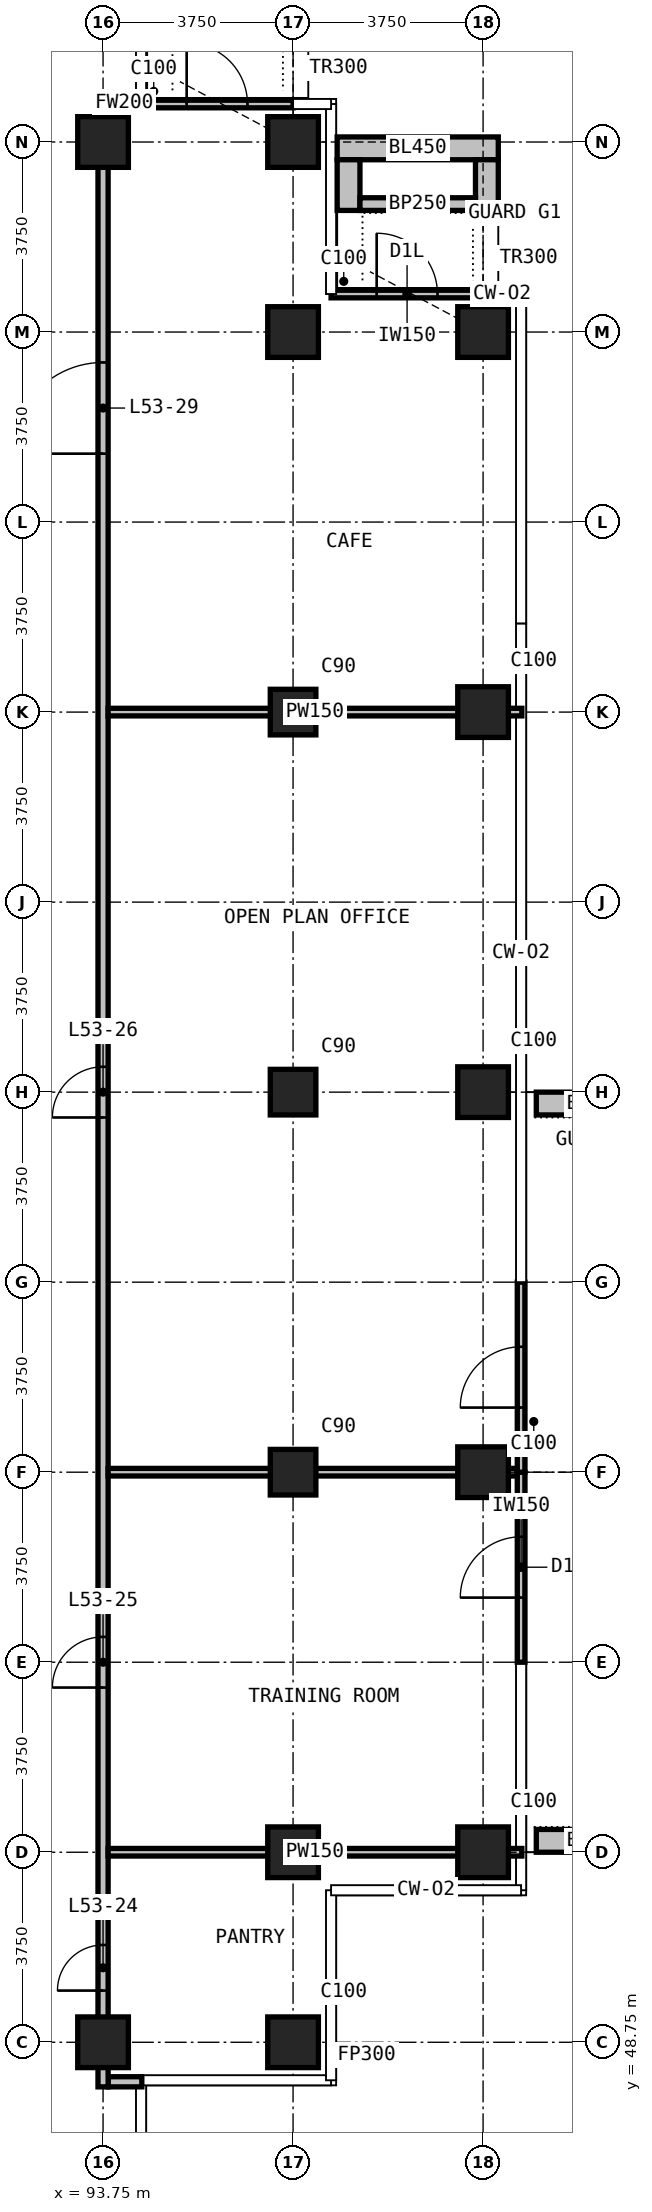
"""IFC4 building model, lengths in metres.
Left out: names, types, materials, properties, quantities, classifications, styles, units other than length and angle.
Written with IfcOpenShell. Run it as: python <this file> out.ifc"""

import sys

from ifc_helpers import new_model, si_unit, direction, frame, frame_2d, origin, origin_2d, place, context, subcontext, project, spatial, rectangle, extrude, element, fill, save


model = new_model("IFC4")
c1 = context("Model", 3, precision=1e-05, world=origin(), true_north=direction((0.0, 1.0)))
c2 = subcontext(c1, "Body", "Model", "MODEL_VIEW")
j1 = project(units=[si_unit("LENGTHUNIT", "METRE"), si_unit("PLANEANGLEUNIT", "RADIAN")], contexts=[c1])
p1 = place(None, origin())
s1 = spatial("IfcSite", under=j1, at=p1, CompositionType="ELEMENT")
p2 = place(p1, origin())
s2 = spatial("IfcBuilding", under=s1, at=p2, CompositionType="ELEMENT")
p3 = place(p2, frame((0.0, 0.0, 206.7)))
s3 = spatial("IfcBuildingStorey", under=s2, at=p3, CompositionType="ELEMENT", Elevation=206.7)
for number, where, z_axis, x_axis in (
    (1, (93.75, 48.75, 0.0), (0.0, 0.0, 1.0), (1.0, 0.0, 0.0)),
    (2, (93.75, 86.25, 0.0), (0.0, 0.0, 1.0), (1.0, 0.0, 0.0)),
    (3, (97.5, 48.75, 0.0), (0.0, 0.0, 1.0), (1.0, 0.0, 0.0)),
    (4, (97.5, 52.5, 0.0), (0.0, 0.0, 1.0), (1.0, 0.0, 0.0)),
):
    element("IfcColumn", number, at=place(p3, frame(where, z_axis=z_axis, x_axis=x_axis)), inside=s3, PredefinedType="COLUMN", context=c2, shape_type="SweptSolid", body=[
        extrude(rectangle(XDim=1.0, YDim=1.0, at=origin_2d()), origin(), (0.0, 0.0, 1.0), 3.6),
    ])
for number, where, z_axis, x_axis in (
    (5, (97.5, 60.0, 0.0), (0.0, 0.0, 1.0), (1.0, 0.0, 0.0)),
    (6, (97.5, 67.5, 0.0), (0.0, 0.0, 1.0), (1.0, 0.0, 0.0)),
    (7, (97.5, 75.0, 0.0), (0.0, 0.0, 1.0), (1.0, 0.0, 0.0)),
):
    element("IfcColumn", number, at=place(p3, frame(where, z_axis=z_axis, x_axis=x_axis)), inside=s3, PredefinedType="COLUMN", context=c2, shape_type="SweptSolid", body=[
        extrude(rectangle(XDim=0.9, YDim=0.9, at=origin_2d()), origin(), (0.0, 0.0, 1.0), 3.6),
    ])
for number, where, z_axis, x_axis in (
    (8, (97.5, 82.5, 0.0), (0.0, 0.0, 1.0), (1.0, 0.0, 0.0)),
    (9, (97.5, 86.25, 0.0), (0.0, 0.0, 1.0), (1.0, 0.0, 0.0)),
    (10, (101.25, 52.5, 0.0), (0.0, 0.0, 1.0), (1.0, 0.0, 0.0)),
    (11, (101.25, 60.0, 0.0), (0.0, 0.0, 1.0), (1.0, 0.0, 0.0)),
    (12, (101.25, 67.5, 0.0), (0.0, 0.0, 1.0), (1.0, 0.0, 0.0)),
    (13, (101.25, 75.0, 0.0), (0.0, 0.0, 1.0), (1.0, 0.0, 0.0)),
    (14, (101.25, 82.5, 0.0), (0.0, 0.0, 1.0), (1.0, 0.0, 0.0)),
):
    element("IfcColumn", number, at=place(p3, frame(where, z_axis=z_axis, x_axis=x_axis)), inside=s3, PredefinedType="COLUMN", context=c2, shape_type="SweptSolid", body=[
        extrude(rectangle(XDim=1.0, YDim=1.0, at=origin_2d()), origin(), (0.0, 0.0, 1.0), 3.6),
    ])
p4 = place(p3, frame((102.0, 56.25, 0.0), z_axis=(0.0, 0.0, 1.0), x_axis=(0.0, 1.0, 0.0)))
e15 = element("IfcWall", 15, at=p4, inside=s3, PredefinedType="SOLIDWALL", context=c2, shape_type="SweptSolid", body=[
    extrude(rectangle(XDim=3.75, YDim=0.15, at=frame_2d((1.875, 0.0))), origin(), (0.0, 0.0, 1.0), 3.3),
])
p5 = place(p4, frame((1.275, 0.0, 0.0)))
e16 = element("IfcOpeningElement", 16, at=p5, cuts=e15, PredefinedType="OPENING", context=c2, shape_type="SweptSolid", body=[
    extrude(rectangle(XDim=1.2, YDim=2.4, at=frame_2d((0.6, 1.2))), frame((0.0, 0.085, 0.0), z_axis=(0.0, -1.0, 0.0), x_axis=(1.0, 0.0, 0.0)), (0.0, 0.0, 1.0), 0.17),
])
p6 = place(p3, frame((102.0, 60.0, 0.0), z_axis=(0.0, 0.0, 1.0), x_axis=(0.0, 1.0, 0.0)))
e17 = element("IfcWall", 17, at=p6, inside=s3, PredefinedType="SOLIDWALL", context=c2, shape_type="SweptSolid", body=[
    extrude(rectangle(XDim=3.75, YDim=0.15, at=frame_2d((1.875, 0.0))), origin(), (0.0, 0.0, 1.0), 3.3),
])
p7 = place(p6, frame((1.275, 0.0, 0.0)))
e18 = element("IfcOpeningElement", 18, at=p7, cuts=e17, PredefinedType="OPENING", context=c2, shape_type="SweptSolid", body=[
    extrude(rectangle(XDim=1.2, YDim=2.4, at=frame_2d((0.6, 1.2))), frame((0.0, 0.085, 0.0), z_axis=(0.0, -1.0, 0.0), x_axis=(1.0, 0.0, 0.0)), (0.0, 0.0, 1.0), 0.17),
])
p8 = place(p3, frame((98.25, 83.25, 0.0), z_axis=(0.0, 0.0, 1.0), x_axis=(1.0, 0.0, 0.0)))
e19 = element("IfcWall", 19, at=p8, inside=s3, PredefinedType="SOLIDWALL", context=c2, shape_type="SweptSolid", body=[
    extrude(rectangle(XDim=3.0, YDim=0.15, at=frame_2d((1.5, 0.0))), origin(), (0.0, 0.0, 1.0), 3.3),
])
p9 = place(p8, frame((0.9, 0.0, 0.0)))
e20 = element("IfcOpeningElement", 20, at=p9, cuts=e19, PredefinedType="OPENING", context=c2, shape_type="SweptSolid", body=[
    extrude(rectangle(XDim=1.2, YDim=2.0, at=frame_2d((0.6, 1.0))), frame((0.0, 0.085, 0.0), z_axis=(0.0, -1.0, 0.0), x_axis=(1.0, 0.0, 0.0)), (0.0, 0.0, 1.0), 0.17),
])
p10 = place(p3, frame((94.5, 87.0, 0.0), z_axis=(0.0, 0.0, 1.0), x_axis=(1.0, 0.0, 0.0)))
e21 = element("IfcWall", 21, at=p10, inside=s3, PredefinedType="SOLIDWALL", context=c2, shape_type="SweptSolid", body=[
    extrude(rectangle(XDim=3.0, YDim=0.15, at=frame_2d((1.5, 0.0))), origin(), (0.0, 0.0, 1.0), 3.3),
])
p11 = place(p10, frame((0.9, 0.0, 0.0)))
e22 = element("IfcOpeningElement", 22, at=p11, cuts=e21, PredefinedType="OPENING", context=c2, shape_type="SweptSolid", body=[
    extrude(rectangle(XDim=1.2, YDim=2.0, at=frame_2d((0.6, 1.0))), frame((0.0, 0.085, 0.0), z_axis=(0.0, -1.0, 0.0), x_axis=(1.0, 0.0, 0.0)), (0.0, 0.0, 1.0), 0.17),
])
for number, where, z_axis, x_axis in (
    (23, (102.3, 52.725, 0.0), (0.0, 0.0, 1.0), (1.0, 0.0, 0.0)),
    (24, (102.3, 67.275, 0.0), (0.0, 0.0, 1.0), (1.0, 0.0, 0.0)),
):
    element("IfcWall", number, at=place(p3, frame(where, z_axis=z_axis, x_axis=x_axis)), inside=s3, PredefinedType="USERDEFINED", context=c2, shape_type="SweptSolid", body=[
        extrude(rectangle(XDim=2.35, YDim=0.45, at=frame_2d((1.175, 0.0))), origin(), (0.0, 0.0, 1.0), 1.1),
    ])
p12 = place(p3, frame((98.37, 86.125, 0.0), z_axis=(0.0, 0.0, 1.0), x_axis=(1.0, 0.0, 0.0)))
e25 = element("IfcWall", 25, at=p12, inside=s3, PredefinedType="USERDEFINED", context=c2, shape_type="SweptSolid", body=[
    extrude(rectangle(XDim=3.18, YDim=0.45, at=frame_2d((1.59, 0.0))), origin(), (0.0, 0.0, 1.0), 1.1),
])
for number, where, z_axis, x_axis in (
    (26, (98.595, 84.9, 0.0), (0.0, 0.0, 1.0), (0.0, 1.0, 0.0)),
    (27, (101.325, 84.9, 0.0), (0.0, 0.0, 1.0), (0.0, 1.0, 0.0)),
):
    element("IfcWall", number, at=place(p3, frame(where, z_axis=z_axis, x_axis=x_axis)), inside=s3, PredefinedType="USERDEFINED", context=c2, shape_type="SweptSolid", body=[
        extrude(rectangle(XDim=1.0, YDim=0.45, at=frame_2d((0.5, 0.0))), origin(), (0.0, 0.0, 1.0), 1.1),
    ])
p13 = place(p3, frame((98.82, 85.025, 0.0), z_axis=(0.0, 0.0, 1.0), x_axis=(1.0, 0.0, 0.0)))
e28 = element("IfcWall", 28, at=p13, inside=s3, PredefinedType="USERDEFINED", context=c2, shape_type="SweptSolid", body=[
    extrude(rectangle(XDim=2.28, YDim=0.25, at=frame_2d((1.14, 0.0))), origin(), (0.0, 0.0, 1.0), 1.0),
])
p14 = place(p3, frame((93.85, 47.97, 0.0), z_axis=(0.0, 0.0, 1.0), x_axis=(1.0, 0.0, 0.0)))
e29 = element("IfcWall", 29, at=p14, inside=s3, PredefinedType="PARTITIONING", context=c2, shape_type="SweptSolid", body=[
    extrude(rectangle(XDim=0.665, YDim=0.2, at=frame_2d((0.333, 0.0))), origin(), (0.0, 0.0, 1.0), 3.3),
])
p15 = place(p3, frame((93.85, 87.03, 0.0), z_axis=(0.0, 0.0, 1.0), x_axis=(1.0, 0.0, 0.0)))
e30 = element("IfcWall", 30, at=p15, inside=s3, PredefinedType="PARTITIONING", context=c2, shape_type="SweptSolid", body=[
    extrude(rectangle(XDim=0.64, YDim=0.2, at=frame_2d((0.32, 0.0))), origin(), (0.0, 0.0, 1.0), 3.3),
])
p16 = place(p3, frame((93.75, 47.87, 0.0), z_axis=(0.0, 0.0, 1.0), x_axis=(0.0, 1.0, 0.0)))
e31 = element("IfcWall", 31, at=p16, inside=s3, PredefinedType="PARTITIONING", context=c2, shape_type="SweptSolid", body=[
    extrude(rectangle(XDim=39.26, YDim=0.2, at=frame_2d((19.63, 0.0))), origin(), (0.0, 0.0, 1.0), 3.3),
])
p17 = place(p16, frame((1.9, 0.0, 0.0)))
e32 = element("IfcOpeningElement", 32, at=p17, cuts=e31, PredefinedType="OPENING", context=c2, shape_type="SweptSolid", body=[
    extrude(rectangle(XDim=0.9, YDim=2.2, at=frame_2d((0.45, 1.1))), frame((0.0, 0.11, 0.0), z_axis=(0.0, -1.0, 0.0), x_axis=(1.0, 0.0, 0.0)), (0.0, 0.0, 1.0), 0.22),
])
p18 = place(p16, frame((7.88, 0.0, 0.0)))
e33 = element("IfcOpeningElement", 33, at=p18, cuts=e31, PredefinedType="OPENING", context=c2, shape_type="SweptSolid", body=[
    extrude(rectangle(XDim=1.0, YDim=2.2, at=frame_2d((0.5, 1.1))), frame((0.0, 0.11, 0.0), z_axis=(0.0, -1.0, 0.0), x_axis=(1.0, 0.0, 0.0)), (0.0, 0.0, 1.0), 0.22),
])
p19 = place(p16, frame((19.13, 0.0, 0.0)))
e34 = element("IfcOpeningElement", 34, at=p19, cuts=e31, PredefinedType="OPENING", context=c2, shape_type="SweptSolid", body=[
    extrude(rectangle(XDim=1.0, YDim=2.2, at=frame_2d((0.5, 1.1))), frame((0.0, 0.11, 0.0), z_axis=(0.0, -1.0, 0.0), x_axis=(1.0, 0.0, 0.0)), (0.0, 0.0, 1.0), 0.22),
])
p20 = place(p16, frame((32.23, 0.0, 0.0)))
e35 = element("IfcOpeningElement", 35, at=p20, cuts=e31, PredefinedType="OPENING", context=c2, shape_type="SweptSolid", body=[
    extrude(rectangle(XDim=1.8, YDim=2.2, at=frame_2d((0.9, 1.1))), frame((0.0, 0.11, 0.0), z_axis=(0.0, -1.0, 0.0), x_axis=(1.0, 0.0, 0.0)), (0.0, 0.0, 1.0), 0.22),
])
p21 = place(p3, frame((93.85, 52.5, 0.0), z_axis=(0.0, 0.0, 1.0), x_axis=(1.0, 0.0, 0.0)))
e36 = element("IfcWall", 36, at=p21, inside=s3, PredefinedType="PARTITIONING", context=c2, shape_type="SweptSolid", body=[
    extrude(rectangle(XDim=8.165, YDim=0.15, at=frame_2d((4.083, 0.0))), origin(), (0.0, 0.0, 1.0), 3.3),
])
p22 = place(p3, frame((93.85, 60.0, 0.0), z_axis=(0.0, 0.0, 1.0), x_axis=(1.0, 0.0, 0.0)))
e37 = element("IfcWall", 37, at=p22, inside=s3, PredefinedType="PARTITIONING", context=c2, shape_type="SweptSolid", body=[
    extrude(rectangle(XDim=8.065, YDim=0.15, at=frame_2d((4.032, 0.0))), origin(), (0.0, 0.0, 1.0), 3.3),
])
p23 = place(p3, frame((93.85, 75.0, 0.0), z_axis=(0.0, 0.0, 1.0), x_axis=(1.0, 0.0, 0.0)))
e38 = element("IfcWall", 38, at=p23, inside=s3, PredefinedType="PARTITIONING", context=c2, shape_type="SweptSolid", body=[
    extrude(rectangle(XDim=8.165, YDim=0.15, at=frame_2d((4.083, 0.0))), origin(), (0.0, 0.0, 1.0), 3.3),
])
p24 = place(p5, origin())
e39 = element("IfcDoor", 39, at=p24, inside=s3, OperationType="SINGLE_SWING_LEFT", PredefinedType="DOOR", context=c2, shape_type="SweptSolid", body=[
    extrude(rectangle(XDim=1.2, YDim=2.4, at=frame_2d((0.6, 1.2))), frame((0.0, 0.025, 0.0), z_axis=(0.0, -1.0, 0.0), x_axis=(1.0, 0.0, 0.0)), (0.0, 0.0, 1.0), 0.05),
])
fill(e16, e39)
p25 = place(p7, origin())
e40 = element("IfcDoor", 40, at=p25, inside=s3, OperationType="SINGLE_SWING_LEFT", PredefinedType="DOOR", context=c2, shape_type="SweptSolid", body=[
    extrude(rectangle(XDim=1.2, YDim=2.4, at=frame_2d((0.6, 1.2))), frame((0.0, 0.025, 0.0), z_axis=(0.0, -1.0, 0.0), x_axis=(1.0, 0.0, 0.0)), (0.0, 0.0, 1.0), 0.05),
])
fill(e18, e40)
p26 = place(p9, origin())
e41 = element("IfcDoor", 41, at=p26, inside=s3, OperationType="SINGLE_SWING_LEFT", PredefinedType="DOOR", context=c2, shape_type="SweptSolid", body=[
    extrude(rectangle(XDim=1.2, YDim=2.0, at=frame_2d((0.6, 1.0))), frame((0.0, 0.025, 0.0), z_axis=(0.0, -1.0, 0.0), x_axis=(1.0, 0.0, 0.0)), (0.0, 0.0, 1.0), 0.05),
])
fill(e20, e41)
p27 = place(p11, origin())
e42 = element("IfcDoor", 42, at=p27, inside=s3, OperationType="SINGLE_SWING_LEFT", PredefinedType="DOOR", context=c2, shape_type="SweptSolid", body=[
    extrude(rectangle(XDim=1.2, YDim=2.0, at=frame_2d((0.6, 1.0))), frame((0.0, 0.025, 0.0), z_axis=(0.0, -1.0, 0.0), x_axis=(1.0, 0.0, 0.0)), (0.0, 0.0, 1.0), 0.05),
])
fill(e22, e42)
p28 = place(p17, origin())
e43 = element("IfcDoor", 43, at=p28, inside=s3, OperationType="SINGLE_SWING_LEFT", PredefinedType="DOOR", context=c2, shape_type="SweptSolid", body=[
    extrude(rectangle(XDim=0.9, YDim=2.2, at=frame_2d((0.45, 1.1))), frame((0.0, 0.025, 0.0), z_axis=(0.0, -1.0, 0.0), x_axis=(1.0, 0.0, 0.0)), (0.0, 0.0, 1.0), 0.05),
])
fill(e32, e43)
p29 = place(p18, origin())
e44 = element("IfcDoor", 44, at=p29, inside=s3, OperationType="SINGLE_SWING_RIGHT", PredefinedType="DOOR", context=c2, shape_type="SweptSolid", body=[
    extrude(rectangle(XDim=1.0, YDim=2.2, at=frame_2d((0.5, 1.1))), frame((0.0, 0.025, 0.0), z_axis=(0.0, -1.0, 0.0), x_axis=(1.0, 0.0, 0.0)), (0.0, 0.0, 1.0), 0.05),
])
fill(e33, e44)
p30 = place(p19, origin())
e45 = element("IfcDoor", 45, at=p30, inside=s3, OperationType="SINGLE_SWING_RIGHT", PredefinedType="DOOR", context=c2, shape_type="SweptSolid", body=[
    extrude(rectangle(XDim=1.0, YDim=2.2, at=frame_2d((0.5, 1.1))), frame((0.0, 0.025, 0.0), z_axis=(0.0, -1.0, 0.0), x_axis=(1.0, 0.0, 0.0)), (0.0, 0.0, 1.0), 0.05),
])
fill(e34, e45)
p31 = place(p20, origin())
e46 = element("IfcDoor", 46, at=p31, inside=s3, OperationType="DOUBLE_DOOR_SINGLE_SWING", PredefinedType="DOOR", context=c2, shape_type="SweptSolid", body=[
    extrude(rectangle(XDim=1.8, YDim=2.2, at=frame_2d((0.9, 1.1))), frame((0.0, 0.025, 0.0), z_axis=(0.0, -1.0, 0.0), x_axis=(1.0, 0.0, 0.0)), (0.0, 0.0, 1.0), 0.05),
])
fill(e35, e46)
save(model, sys.argv[1])
